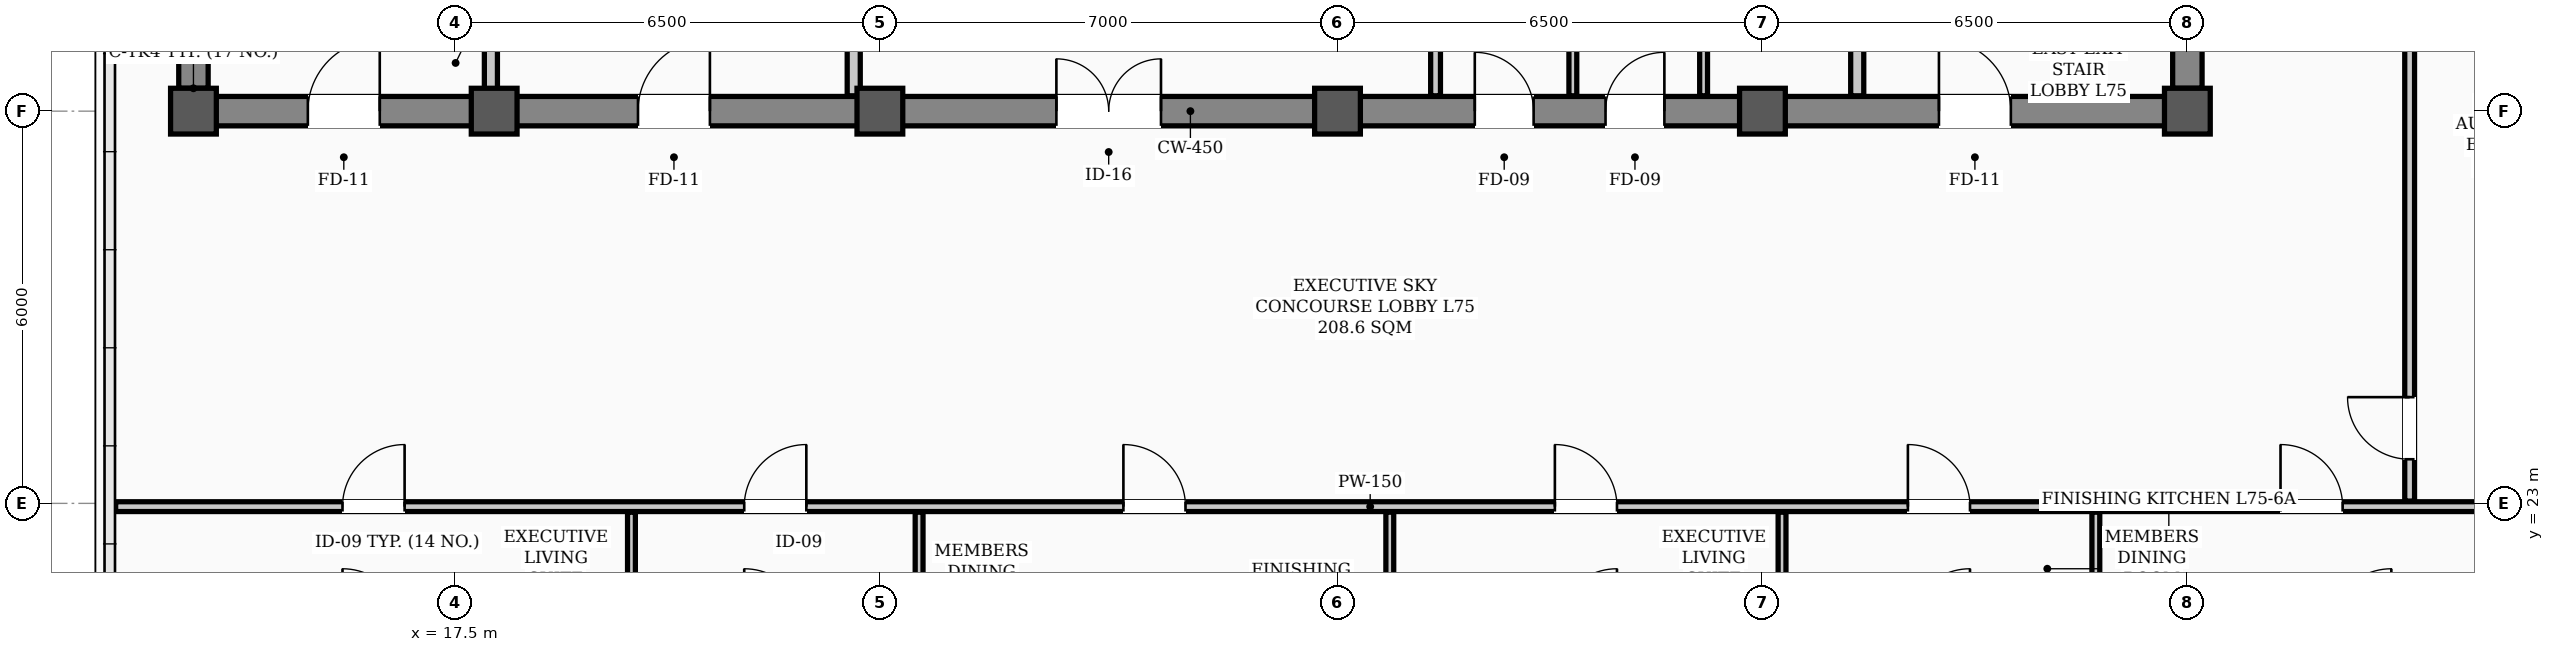
"""IFC4 building model, lengths in metres.
Left out: names, types, materials, properties, quantities, classifications, styles, units other than length and angle.
Written with IfcOpenShell. Run it as: python <this file> out.ifc"""

import sys

from ifc_helpers import new_model, si_unit, direction, frame, frame_2d, origin, origin_2d, place, context, subcontext, project, spatial, rectangle, hollow_rectangle, extrude, element, fill, save


model = new_model("IFC4")
c1 = context("Model", 3, precision=1e-05, world=origin(), true_north=direction((0.0, 1.0)))
c2 = subcontext(c1, "Body", "Model", "MODEL_VIEW")
j1 = project(units=[si_unit("LENGTHUNIT", "METRE"), si_unit("PLANEANGLEUNIT", "RADIAN")], contexts=[c1])
p1 = place(None, origin())
s1 = spatial("IfcSite", under=j1, at=p1, CompositionType="ELEMENT")
p2 = place(p1, origin())
s2 = spatial("IfcBuilding", under=s1, at=p2, CompositionType="ELEMENT")
p3 = place(p2, frame((0.0, 0.0, 300.8)))
s3 = spatial("IfcBuildingStorey", under=s2, at=p3, CompositionType="ELEMENT", Elevation=300.8)
for number, where, z_axis, x_axis in (
    (1, (13.5, 29.0, 0.0), (0.0, 0.0, 1.0), (1.0, 0.0, 0.0)),
    (2, (18.1, 29.0, 0.0), (0.0, 0.0, 1.0), (1.0, 0.0, 0.0)),
    (3, (24.0, 29.0, 0.0), (0.0, 0.0, 1.0), (1.0, 0.0, 0.0)),
    (4, (31.0, 29.0, 0.0), (0.0, 0.0, 1.0), (1.0, 0.0, 0.0)),
    (5, (37.5, 29.0, 0.0), (0.0, 0.0, 1.0), (1.0, 0.0, 0.0)),
    (6, (44.0, 29.0, 0.0), (0.0, 0.0, 1.0), (1.0, 0.0, 0.0)),
):
    element("IfcColumn", number, at=place(p3, frame(where, z_axis=z_axis, x_axis=x_axis)), inside=s3, PredefinedType="COLUMN", context=c2, shape_type="SweptSolid", body=[
        extrude(hollow_rectangle(XDim=0.7, YDim=0.7, WallThickness=0.028, InnerFilletRadius=0.014, OuterFilletRadius=0.042, at=origin_2d()), origin(), (0.0, 0.0, 1.0), 5.2),
    ])
p4 = place(p3, frame((13.5, 29.0, 0.0), z_axis=(0.0, 0.0, 1.0), x_axis=(1.0, 0.0, 0.0)))
e7 = element("IfcWall", 7, at=p4, inside=s3, PredefinedType="SHEAR", context=c2, shape_type="SweptSolid", body=[
    extrude(rectangle(XDim=30.5, YDim=0.45, at=frame_2d((15.25, 0.0))), origin(), (0.0, 0.0, 1.0), 4.9),
])
p5 = place(p4, frame((1.75, 0.0, 0.0)))
e8 = element("IfcOpeningElement", 8, at=p5, cuts=e7, PredefinedType="OPENING", context=c2, shape_type="SweptSolid", body=[
    extrude(rectangle(XDim=1.1, YDim=2.08, at=frame_2d((0.55, 1.04))), frame((0.0, 0.235, 0.0), z_axis=(0.0, -1.0, 0.0), x_axis=(1.0, 0.0, 0.0)), (0.0, 0.0, 1.0), 0.47),
])
p6 = place(p4, frame((26.7, 0.0, 0.0)))
e9 = element("IfcOpeningElement", 9, at=p6, cuts=e7, PredefinedType="OPENING", context=c2, shape_type="SweptSolid", body=[
    extrude(rectangle(XDim=1.1, YDim=2.08, at=frame_2d((0.55, 1.04))), frame((0.0, 0.235, 0.0), z_axis=(0.0, -1.0, 0.0), x_axis=(1.0, 0.0, 0.0)), (0.0, 0.0, 1.0), 0.47),
])
p7 = place(p4, frame((6.8, 0.0, 0.0)))
e10 = element("IfcOpeningElement", 10, at=p7, cuts=e7, PredefinedType="OPENING", context=c2, shape_type="SweptSolid", body=[
    extrude(rectangle(XDim=1.1, YDim=2.08, at=frame_2d((0.55, 1.04))), frame((0.0, 0.235, 0.0), z_axis=(0.0, -1.0, 0.0), x_axis=(1.0, 0.0, 0.0)), (0.0, 0.0, 1.0), 0.47),
])
p8 = place(p4, frame((13.2, 0.0, 0.0)))
e11 = element("IfcOpeningElement", 11, at=p8, cuts=e7, PredefinedType="OPENING", context=c2, shape_type="SweptSolid", body=[
    extrude(rectangle(XDim=1.6, YDim=2.08, at=frame_2d((0.8, 1.04))), frame((0.0, 0.235, 0.0), z_axis=(0.0, -1.0, 0.0), x_axis=(1.0, 0.0, 0.0)), (0.0, 0.0, 1.0), 0.47),
])
p9 = place(p4, frame((19.6, 0.0, 0.0)))
e12 = element("IfcOpeningElement", 12, at=p9, cuts=e7, PredefinedType="OPENING", context=c2, shape_type="SweptSolid", body=[
    extrude(rectangle(XDim=0.9, YDim=2.08, at=frame_2d((0.45, 1.04))), frame((0.0, 0.235, 0.0), z_axis=(0.0, -1.0, 0.0), x_axis=(1.0, 0.0, 0.0)), (0.0, 0.0, 1.0), 0.47),
])
p10 = place(p4, frame((21.6, 0.0, 0.0)))
e13 = element("IfcOpeningElement", 13, at=p10, cuts=e7, PredefinedType="OPENING", context=c2, shape_type="SweptSolid", body=[
    extrude(rectangle(XDim=0.9, YDim=2.08, at=frame_2d((0.45, 1.04))), frame((0.0, 0.235, 0.0), z_axis=(0.0, -1.0, 0.0), x_axis=(1.0, 0.0, 0.0)), (0.0, 0.0, 1.0), 0.47),
])
for number, where, z_axis, x_axis in (
    (14, (13.5, 29.35, 0.0), (0.0, 0.0, 1.0), (0.0, 1.0, 0.0)),
    (15, (44.0, 29.35, 0.0), (0.0, 0.0, 1.0), (0.0, 1.0, 0.0)),
):
    element("IfcWall", number, at=place(p3, frame(where, z_axis=z_axis, x_axis=x_axis)), inside=s3, PredefinedType="SHEAR", context=c2, shape_type="SweptSolid", body=[
        extrude(rectangle(XDim=8.6, YDim=0.45, at=frame_2d((4.3, 0.0))), origin(), (0.0, 0.0, 1.0), 4.9),
    ])
p11 = place(p3, frame((12.31, 22.95, 0.0), z_axis=(0.0, 0.0, 1.0), x_axis=(1.0, 0.0, 0.0)))
e16 = element("IfcWall", 16, at=p11, inside=s3, PredefinedType="PARTITIONING", context=c2, shape_type="SweptSolid", body=[
    extrude(rectangle(XDim=38.38, YDim=0.15, at=frame_2d((19.19, 0.0))), origin(), (0.0, 0.0, 1.0), 3.48),
])
p12 = place(p11, frame((3.47, 0.0, 0.0)))
e17 = element("IfcOpeningElement", 17, at=p12, cuts=e16, PredefinedType="OPENING", context=c2, shape_type="SweptSolid", body=[
    extrude(rectangle(XDim=0.95, YDim=2.08, at=frame_2d((0.475, 1.04))), frame((0.0, 0.085, 0.0), z_axis=(0.0, -1.0, 0.0), x_axis=(1.0, 0.0, 0.0)), (0.0, 0.0, 1.0), 0.17),
])
p13 = place(p11, frame((9.615, 0.0, 0.0)))
e18 = element("IfcOpeningElement", 18, at=p13, cuts=e16, PredefinedType="OPENING", context=c2, shape_type="SweptSolid", body=[
    extrude(rectangle(XDim=0.95, YDim=2.08, at=frame_2d((0.475, 1.04))), frame((0.0, 0.085, 0.0), z_axis=(0.0, -1.0, 0.0), x_axis=(1.0, 0.0, 0.0)), (0.0, 0.0, 1.0), 0.17),
])
p14 = place(p11, frame((15.415, 0.0, 0.0)))
e19 = element("IfcOpeningElement", 19, at=p14, cuts=e16, PredefinedType="OPENING", context=c2, shape_type="SweptSolid", body=[
    extrude(rectangle(XDim=0.95, YDim=2.08, at=frame_2d((0.475, 1.04))), frame((0.0, 0.085, 0.0), z_axis=(0.0, -1.0, 0.0), x_axis=(1.0, 0.0, 0.0)), (0.0, 0.0, 1.0), 0.17),
])
p15 = place(p11, frame((22.015, 0.0, 0.0)))
e20 = element("IfcOpeningElement", 20, at=p15, cuts=e16, PredefinedType="OPENING", context=c2, shape_type="SweptSolid", body=[
    extrude(rectangle(XDim=0.95, YDim=2.08, at=frame_2d((0.475, 1.04))), frame((0.0, 0.085, 0.0), z_axis=(0.0, -1.0, 0.0), x_axis=(1.0, 0.0, 0.0)), (0.0, 0.0, 1.0), 0.17),
])
p16 = place(p11, frame((27.415, 0.0, 0.0)))
e21 = element("IfcOpeningElement", 21, at=p16, cuts=e16, PredefinedType="OPENING", context=c2, shape_type="SweptSolid", body=[
    extrude(rectangle(XDim=0.95, YDim=2.08, at=frame_2d((0.475, 1.04))), frame((0.0, 0.085, 0.0), z_axis=(0.0, -1.0, 0.0), x_axis=(1.0, 0.0, 0.0)), (0.0, 0.0, 1.0), 0.17),
])
p17 = place(p11, frame((33.115, 0.0, 0.0)))
e22 = element("IfcOpeningElement", 22, at=p17, cuts=e16, PredefinedType="OPENING", context=c2, shape_type="SweptSolid", body=[
    extrude(rectangle(XDim=0.95, YDim=2.08, at=frame_2d((0.475, 1.04))), frame((0.0, 0.085, 0.0), z_axis=(0.0, -1.0, 0.0), x_axis=(1.0, 0.0, 0.0)), (0.0, 0.0, 1.0), 0.17),
])
p18 = place(p3, frame((18.05, 29.235, 0.0), z_axis=(0.0, 0.0, 1.0), x_axis=(0.0, 1.0, 0.0)))
e23 = element("IfcWall", 23, at=p18, inside=s3, PredefinedType="STANDARD", context=c2, shape_type="SweptSolid", body=[
    extrude(rectangle(XDim=1.065, YDim=0.2, at=frame_2d((0.532, 0.0))), origin(), (0.0, 0.0, 1.0), 4.9),
])
p19 = place(p3, frame((38.95, 29.235, 0.0), z_axis=(0.0, 0.0, 1.0), x_axis=(0.0, 1.0, 0.0)))
e24 = element("IfcWall", 24, at=p19, inside=s3, PredefinedType="STANDARD", context=c2, shape_type="SweptSolid", body=[
    extrude(rectangle(XDim=1.065, YDim=0.2, at=frame_2d((0.532, 0.0))), origin(), (0.0, 0.0, 1.0), 3.48),
])
p20 = place(p3, frame((23.6, 29.235, 0.0), z_axis=(0.0, 0.0, 1.0), x_axis=(0.0, 1.0, 0.0)))
e25 = element("IfcWall", 25, at=p20, inside=s3, PredefinedType="STANDARD", context=c2, shape_type="SweptSolid", body=[
    extrude(rectangle(XDim=5.465, YDim=0.2, at=frame_2d((2.732, 0.0))), origin(), (0.0, 0.0, 1.0), 3.48),
])
p21 = place(p3, frame((32.5, 29.235, 0.0), z_axis=(0.0, 0.0, 1.0), x_axis=(0.0, 1.0, 0.0)))
e26 = element("IfcWall", 26, at=p21, inside=s3, PredefinedType="PARTITIONING", context=c2, shape_type="SweptSolid", body=[
    extrude(rectangle(XDim=2.53, YDim=0.15, at=frame_2d((1.265, 0.0))), origin(), (0.0, 0.0, 1.0), 3.48),
])
for number, where, z_axis, x_axis in (
    (27, (36.6, 29.235, 0.0), (0.0, 0.0, 1.0), (0.0, 1.0, 0.0)),
    (28, (34.6, 29.235, 0.0), (0.0, 0.0, 1.0), (0.0, 1.0, 0.0)),
):
    element("IfcWall", number, at=place(p3, frame(where, z_axis=z_axis, x_axis=x_axis)), inside=s3, PredefinedType="PARTITIONING", context=c2, shape_type="SweptSolid", body=[
        extrude(rectangle(XDim=2.53, YDim=0.12, at=frame_2d((1.265, 0.0))), origin(), (0.0, 0.0, 1.0), 3.48),
    ])
p22 = place(p3, frame((47.4, 23.035, 0.0), z_axis=(0.0, 0.0, 1.0), x_axis=(0.0, 1.0, 0.0)))
e29 = element("IfcWall", 29, at=p22, inside=s3, PredefinedType="PARTITIONING", context=c2, shape_type="SweptSolid", body=[
    extrude(rectangle(XDim=18.63, YDim=0.15, at=frame_2d((9.315, 0.0))), origin(), (0.0, 0.0, 1.0), 3.48),
])
p23 = place(p22, frame((0.64, 0.0, 0.0)))
e30 = element("IfcOpeningElement", 30, at=p23, cuts=e29, PredefinedType="OPENING", context=c2, shape_type="SweptSolid", body=[
    extrude(rectangle(XDim=0.95, YDim=2.08, at=frame_2d((0.475, 1.04))), frame((0.0, 0.085, 0.0), z_axis=(0.0, -1.0, 0.0), x_axis=(1.0, 0.0, 0.0)), (0.0, 0.0, 1.0), 0.17),
])
p24 = place(p22, frame((10.59, 0.0, 0.0)))
e31 = element("IfcOpeningElement", 31, at=p24, cuts=e29, PredefinedType="OPENING", context=c2, shape_type="SweptSolid", body=[
    extrude(rectangle(XDim=0.95, YDim=2.08, at=frame_2d((0.475, 1.04))), frame((0.0, 0.085, 0.0), z_axis=(0.0, -1.0, 0.0), x_axis=(1.0, 0.0, 0.0)), (0.0, 0.0, 1.0), 0.17),
])
p25 = place(p22, frame((15.365, 0.0, 0.0)))
e32 = element("IfcOpeningElement", 32, at=p25, cuts=e29, PredefinedType="OPENING", context=c2, shape_type="SweptSolid", body=[
    extrude(rectangle(XDim=0.95, YDim=2.08, at=frame_2d((0.475, 1.04))), frame((0.0, 0.085, 0.0), z_axis=(0.0, -1.0, 0.0), x_axis=(1.0, 0.0, 0.0)), (0.0, 0.0, 1.0), 0.17),
])
p26 = place(p3, frame((20.2, 18.71, 0.0), z_axis=(0.0, 0.0, 1.0), x_axis=(0.0, 1.0, 0.0)))
e33 = element("IfcWall", 33, at=p26, inside=s3, PredefinedType="PARTITIONING", context=c2, shape_type="SweptSolid", body=[
    extrude(rectangle(XDim=4.155, YDim=0.12, at=frame_2d((2.078, 0.0))), origin(), (0.0, 0.0, 1.0), 4.9),
])
p27 = place(p3, frame((24.6, 20.47, 0.0), z_axis=(0.0, 0.0, 1.0), x_axis=(0.0, 1.0, 0.0)))
e34 = element("IfcWall", 34, at=p27, inside=s3, PredefinedType="PARTITIONING", context=c2, shape_type="SweptSolid", body=[
    extrude(rectangle(XDim=2.395, YDim=0.12, at=frame_2d((1.198, 0.0))), origin(), (0.0, 0.0, 1.0), 3.48),
])
for number, where, z_axis, x_axis in (
    (35, (31.8, 18.71, 0.0), (0.0, 0.0, 1.0), (0.0, 1.0, 0.0)),
    (36, (37.8, 18.71, 0.0), (0.0, 0.0, 1.0), (0.0, 1.0, 0.0)),
    (37, (42.6, 18.71, 0.0), (0.0, 0.0, 1.0), (0.0, 1.0, 0.0)),
):
    element("IfcWall", number, at=place(p3, frame(where, z_axis=z_axis, x_axis=x_axis)), inside=s3, PredefinedType="PARTITIONING", context=c2, shape_type="SweptSolid", body=[
        extrude(rectangle(XDim=4.155, YDim=0.12, at=frame_2d((2.078, 0.0))), origin(), (0.0, 0.0, 1.0), 3.48),
    ])
p28 = place(p5, origin())
e38 = element("IfcDoor", 38, at=p28, inside=s3, OperationType="SINGLE_SWING_RIGHT", PredefinedType="DOOR", context=c2, shape_type="SweptSolid", body=[
    extrude(rectangle(XDim=1.1, YDim=2.08, at=frame_2d((0.55, 1.04))), frame((0.0, 0.025, 0.0), z_axis=(0.0, -1.0, 0.0), x_axis=(1.0, 0.0, 0.0)), (0.0, 0.0, 1.0), 0.05),
])
fill(e8, e38)
p29 = place(p6, origin())
e39 = element("IfcDoor", 39, at=p29, inside=s3, OperationType="SINGLE_SWING_LEFT", PredefinedType="DOOR", context=c2, shape_type="SweptSolid", body=[
    extrude(rectangle(XDim=1.1, YDim=2.08, at=frame_2d((0.55, 1.04))), frame((0.0, 0.025, 0.0), z_axis=(0.0, -1.0, 0.0), x_axis=(1.0, 0.0, 0.0)), (0.0, 0.0, 1.0), 0.05),
])
fill(e9, e39)
p30 = place(p7, origin())
e40 = element("IfcDoor", 40, at=p30, inside=s3, OperationType="SINGLE_SWING_RIGHT", PredefinedType="DOOR", context=c2, shape_type="SweptSolid", body=[
    extrude(rectangle(XDim=1.1, YDim=2.08, at=frame_2d((0.55, 1.04))), frame((0.0, 0.025, 0.0), z_axis=(0.0, -1.0, 0.0), x_axis=(1.0, 0.0, 0.0)), (0.0, 0.0, 1.0), 0.05),
])
fill(e10, e40)
p31 = place(p8, origin())
e41 = element("IfcDoor", 41, at=p31, inside=s3, OperationType="DOUBLE_DOOR_SINGLE_SWING", PredefinedType="DOOR", context=c2, shape_type="SweptSolid", body=[
    extrude(rectangle(XDim=1.6, YDim=2.08, at=frame_2d((0.8, 1.04))), frame((0.0, 0.025, 0.0), z_axis=(0.0, -1.0, 0.0), x_axis=(1.0, 0.0, 0.0)), (0.0, 0.0, 1.0), 0.05),
])
fill(e11, e41)
p32 = place(p9, origin())
e42 = element("IfcDoor", 42, at=p32, inside=s3, OperationType="SINGLE_SWING_LEFT", PredefinedType="DOOR", context=c2, shape_type="SweptSolid", body=[
    extrude(rectangle(XDim=0.9, YDim=2.08, at=frame_2d((0.45, 1.04))), frame((0.0, 0.025, 0.0), z_axis=(0.0, -1.0, 0.0), x_axis=(1.0, 0.0, 0.0)), (0.0, 0.0, 1.0), 0.05),
])
fill(e12, e42)
p33 = place(p10, origin())
e43 = element("IfcDoor", 43, at=p33, inside=s3, OperationType="SINGLE_SWING_RIGHT", PredefinedType="DOOR", context=c2, shape_type="SweptSolid", body=[
    extrude(rectangle(XDim=0.9, YDim=2.08, at=frame_2d((0.45, 1.04))), frame((0.0, 0.025, 0.0), z_axis=(0.0, -1.0, 0.0), x_axis=(1.0, 0.0, 0.0)), (0.0, 0.0, 1.0), 0.05),
])
fill(e13, e43)
p34 = place(p12, origin())
e44 = element("IfcDoor", 44, at=p34, inside=s3, OperationType="SINGLE_SWING_RIGHT", PredefinedType="DOOR", context=c2, shape_type="SweptSolid", body=[
    extrude(rectangle(XDim=0.95, YDim=2.08, at=frame_2d((0.475, 1.04))), frame((0.0, 0.025, 0.0), z_axis=(0.0, -1.0, 0.0), x_axis=(1.0, 0.0, 0.0)), (0.0, 0.0, 1.0), 0.05),
])
fill(e17, e44)
p35 = place(p13, origin())
e45 = element("IfcDoor", 45, at=p35, inside=s3, OperationType="SINGLE_SWING_RIGHT", PredefinedType="DOOR", context=c2, shape_type="SweptSolid", body=[
    extrude(rectangle(XDim=0.95, YDim=2.08, at=frame_2d((0.475, 1.04))), frame((0.0, 0.025, 0.0), z_axis=(0.0, -1.0, 0.0), x_axis=(1.0, 0.0, 0.0)), (0.0, 0.0, 1.0), 0.05),
])
fill(e18, e45)
p36 = place(p14, origin())
e46 = element("IfcDoor", 46, at=p36, inside=s3, OperationType="SINGLE_SWING_LEFT", PredefinedType="DOOR", context=c2, shape_type="SweptSolid", body=[
    extrude(rectangle(XDim=0.95, YDim=2.08, at=frame_2d((0.475, 1.04))), frame((0.0, 0.025, 0.0), z_axis=(0.0, -1.0, 0.0), x_axis=(1.0, 0.0, 0.0)), (0.0, 0.0, 1.0), 0.05),
])
fill(e19, e46)
p37 = place(p15, origin())
e47 = element("IfcDoor", 47, at=p37, inside=s3, OperationType="SINGLE_SWING_LEFT", PredefinedType="DOOR", context=c2, shape_type="SweptSolid", body=[
    extrude(rectangle(XDim=0.95, YDim=2.08, at=frame_2d((0.475, 1.04))), frame((0.0, 0.025, 0.0), z_axis=(0.0, -1.0, 0.0), x_axis=(1.0, 0.0, 0.0)), (0.0, 0.0, 1.0), 0.05),
])
fill(e20, e47)
p38 = place(p16, origin())
e48 = element("IfcDoor", 48, at=p38, inside=s3, OperationType="SINGLE_SWING_LEFT", PredefinedType="DOOR", context=c2, shape_type="SweptSolid", body=[
    extrude(rectangle(XDim=0.95, YDim=2.08, at=frame_2d((0.475, 1.04))), frame((0.0, 0.025, 0.0), z_axis=(0.0, -1.0, 0.0), x_axis=(1.0, 0.0, 0.0)), (0.0, 0.0, 1.0), 0.05),
])
fill(e21, e48)
p39 = place(p17, origin())
e49 = element("IfcDoor", 49, at=p39, inside=s3, OperationType="SINGLE_SWING_LEFT", PredefinedType="DOOR", context=c2, shape_type="SweptSolid", body=[
    extrude(rectangle(XDim=0.95, YDim=2.08, at=frame_2d((0.475, 1.04))), frame((0.0, 0.025, 0.0), z_axis=(0.0, -1.0, 0.0), x_axis=(1.0, 0.0, 0.0)), (0.0, 0.0, 1.0), 0.05),
])
fill(e22, e49)
p40 = place(p23, origin())
e50 = element("IfcDoor", 50, at=p40, inside=s3, OperationType="SINGLE_SWING_RIGHT", PredefinedType="DOOR", context=c2, shape_type="SweptSolid", body=[
    extrude(rectangle(XDim=0.95, YDim=2.08, at=frame_2d((0.475, 1.04))), frame((0.0, 0.025, 0.0), z_axis=(0.0, -1.0, 0.0), x_axis=(1.0, 0.0, 0.0)), (0.0, 0.0, 1.0), 0.05),
])
fill(e30, e50)
save(model, sys.argv[1])
